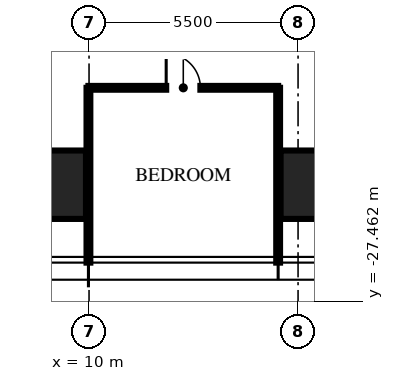
"""IFC4 building model, lengths in metres.
Left out: names, types, materials, properties, quantities, classifications, styles, units other than length and angle.
Written with IfcOpenShell. Run it as: python <this file> out.ifc"""

import sys

from ifc_helpers import new_model, si_unit, direction, frame, frame_2d, origin, origin_2d, place, context, subcontext, project, spatial, rectangle, hollow_rectangle, extrude, element, fill, save


model = new_model("IFC4")
c1 = context("Model", 3, precision=1e-05, world=origin(), true_north=direction((0.0, 1.0)))
c2 = subcontext(c1, "Body", "Model", "MODEL_VIEW")
j1 = project(units=[si_unit("LENGTHUNIT", "METRE"), si_unit("PLANEANGLEUNIT", "RADIAN")], contexts=[c1])
p1 = place(None, origin())
s1 = spatial("IfcSite", under=j1, at=p1, CompositionType="ELEMENT")
p2 = place(p1, origin())
s2 = spatial("IfcBuilding", under=s1, at=p2, CompositionType="ELEMENT")
p3 = place(p2, frame((0.0, 0.0, 210.75)))
s3 = spatial("IfcBuildingStorey", under=s2, at=p3, CompositionType="ELEMENT", Elevation=210.75)
for number, where, z_axis, x_axis in (
    (1, (16.64, -24.4, 0.0), (0.0, 0.0, 1.0), (1.0, 0.0, 0.0)),
    (2, (8.32, -24.4, 0.0), (0.0, 0.0, 1.0), (1.0, 0.0, 0.0)),
):
    element("IfcColumn", number, at=place(p3, frame(where, z_axis=z_axis, x_axis=x_axis)), inside=s3, PredefinedType="COLUMN", context=c2, shape_type="SweptSolid", body=[
        extrude(hollow_rectangle(XDim=3.2, YDim=1.8, WallThickness=0.2, at=origin_2d()), origin(), (0.0, 0.0, 1.0), 3.75),
    ])
for number, where, z_axis, x_axis in (
    (3, (9.984, -21.85, 0.0), (0.0, 0.0, 1.0), (0.0, -1.0, 0.0)),
    (4, (14.976, -21.85, 0.0), (0.0, 0.0, 1.0), (0.0, -1.0, 0.0)),
):
    element("IfcWall", number, at=place(p3, frame(where, z_axis=z_axis, x_axis=x_axis)), inside=s3, PredefinedType="PARTITIONING", context=c2, shape_type="SweptSolid", body=[
        extrude(rectangle(XDim=4.6, YDim=0.1, at=frame_2d((2.3, 0.0))), origin(), (0.0, 0.0, 1.0), 2.91),
    ])
p4 = place(p3, frame((9.984, -21.85, 0.0), z_axis=(0.0, 0.0, 1.0), x_axis=(1.0, 0.0, 0.0)))
e5 = element("IfcWall", 5, at=p4, inside=s3, PredefinedType="PARTITIONING", context=c2, shape_type="SweptSolid", body=[
    extrude(rectangle(XDim=4.992, YDim=0.1, at=frame_2d((2.496, 0.0))), origin(), (0.0, 0.0, 1.0), 2.81),
])
p5 = place(p4, frame((2.046, 0.0, 0.0)))
e6 = element("IfcOpeningElement", 6, at=p5, cuts=e5, PredefinedType="OPENING", context=c2, shape_type="SweptSolid", body=[
    extrude(rectangle(XDim=0.9, YDim=2.1, at=frame_2d((0.45, 1.05))), frame((0.0, 0.06, 0.0), z_axis=(0.0, -1.0, 0.0), x_axis=(1.0, 0.0, 0.0)), (0.0, 0.0, 1.0), 0.12),
])
p6 = place(p5, origin())
e7 = element("IfcDoor", 7, at=p6, inside=s3, OperationType="SINGLE_SWING_LEFT", PredefinedType="DOOR", context=c2, shape_type="SweptSolid", body=[
    extrude(rectangle(XDim=0.9, YDim=2.1, at=frame_2d((0.45, 1.05))), frame((0.0, 0.025, 0.0), z_axis=(0.0, -1.0, 0.0), x_axis=(1.0, 0.0, 0.0)), (0.0, 0.0, 1.0), 0.05),
])
fill(e6, e7)
save(model, sys.argv[1])
